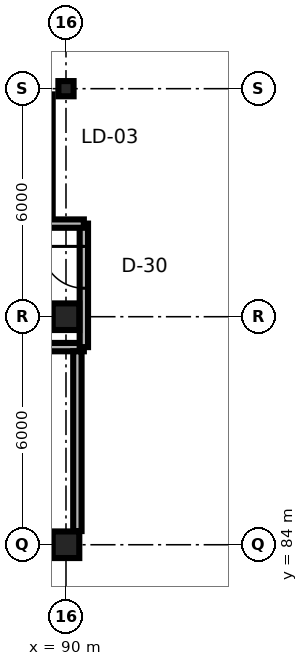
"""IFC4 building model, lengths in metres.
Left out: names, types, materials, properties, quantities, classifications, styles, units other than length and angle.
Written with IfcOpenShell. Run it as: python <this file> out.ifc"""

import sys

from ifc_helpers import new_model, si_unit, direction, frame, frame_2d, origin, origin_2d, place, context, subcontext, project, spatial, rectangle, i_section, extrude, element, fill, save


model = new_model("IFC4")
c1 = context("Model", 3, precision=1e-05, world=origin(), true_north=direction((0.0, 1.0)))
c2 = subcontext(c1, "Body", "Model", "MODEL_VIEW")
j1 = project(units=[si_unit("LENGTHUNIT", "METRE"), si_unit("PLANEANGLEUNIT", "RADIAN")], contexts=[c1])
p1 = place(None, origin())
s1 = spatial("IfcSite", under=j1, at=p1, CompositionType="ELEMENT")
p2 = place(p1, origin())
s2 = spatial("IfcBuilding", under=s1, at=p2, CompositionType="ELEMENT")
p3 = place(p2, frame((0.0, 0.0, 21.0)))
s3 = spatial("IfcBuildingStorey", under=s2, at=p3, CompositionType="ELEMENT", Elevation=21.0)
for number, where, z_axis, x_axis in (
    (1, (90.0, 84.0, 0.0), (0.0, 0.0, 1.0), (1.0, 0.0, 0.0)),
    (2, (90.0, 90.0, 0.0), (0.0, 0.0, 1.0), (1.0, 0.0, 0.0)),
):
    element("IfcColumn", number, at=place(p3, frame(where, z_axis=z_axis, x_axis=x_axis)), inside=s3, PredefinedType="COLUMN", context=c2, shape_type="SweptSolid", body=[
        extrude(rectangle(XDim=0.7, YDim=0.7, at=origin_2d()), origin(), (0.0, 0.0, 1.0), 3.9),
    ])
p4 = place(p3, frame((90.0, 96.0, 0.0), z_axis=(0.0, 0.0, 1.0), x_axis=(1.0, 0.0, 0.0)))
e3 = element("IfcColumn", 3, at=p4, inside=s3, PredefinedType="COLUMN", context=c2, shape_type="SweptSolid", body=[
    extrude(i_section(OverallWidth=0.4, OverallDepth=0.4, WebThickness=0.013, FlangeThickness=0.021, FilletRadius=0.022, at=origin_2d()), origin(), (0.0, 0.0, 1.0), 3.9),
])
p5 = place(p3, frame((89.5, 92.45, 0.0), z_axis=(0.0, 0.0, 1.0), x_axis=(0.0, 1.0, 0.0)))
e4 = element("IfcWall", 4, at=p5, inside=s3, PredefinedType="SHEAR", context=c2, shape_type="SweptSolid", body=[
    extrude(rectangle(XDim=3.4, YDim=0.3, at=frame_2d((1.7, 0.0))), origin(), (0.0, 0.0, 1.0), 3.74),
])
p6 = place(p3, frame((87.8, 84.0, 0.0), z_axis=(0.0, 0.0, 1.0), x_axis=(1.0, 0.0, 0.0)))
e5 = element("IfcWall", 5, at=p6, inside=s3, PredefinedType="PARTITIONING", context=c2, shape_type="SweptSolid", body=[
    extrude(rectangle(XDim=2.5, YDim=0.22, at=frame_2d((1.25, 0.0))), origin(), (0.0, 0.0, 1.0), 3.312),
])
p7 = place(p6, frame((0.75, 0.0, 0.0)))
e6 = element("IfcOpeningElement", 6, at=p7, cuts=e5, PredefinedType="OPENING", context=c2, shape_type="SweptSolid", body=[
    extrude(rectangle(XDim=1.0, YDim=2.15, at=frame_2d((0.5, 1.075))), frame((0.0, 0.125, 0.0), z_axis=(0.0, -1.0, 0.0), x_axis=(1.0, 0.0, 0.0)), (0.0, 0.0, 1.0), 0.25),
])
p8 = place(p3, frame((80.6, 89.2, 0.0), z_axis=(0.0, 0.0, 1.0), x_axis=(1.0, 0.0, 0.0)))
e7 = element("IfcWall", 7, at=p8, inside=s3, PredefinedType="PARTITIONING", context=c2, shape_type="SweptSolid", body=[
    extrude(rectangle(XDim=9.87, YDim=0.22, at=frame_2d((4.935, 0.0))), origin(), (0.0, 0.0, 1.0), 3.7),
])
p9 = place(p3, frame((90.47, 89.2, 0.0), z_axis=(0.0, 0.0, 1.0), x_axis=(0.0, 1.0, 0.0)))
e8 = element("IfcWall", 8, at=p9, inside=s3, PredefinedType="PARTITIONING", context=c2, shape_type="SweptSolid", body=[
    extrude(rectangle(XDim=3.25, YDim=0.22, at=frame_2d((1.625, 0.0))), origin(), (0.0, 0.0, 1.0), 3.7),
])
p10 = place(p9, frame((1.55, 0.0, 0.0)))
e9 = element("IfcOpeningElement", 9, at=p10, cuts=e8, PredefinedType="OPENING", context=c2, shape_type="SweptSolid", body=[
    extrude(rectangle(XDim=1.1, YDim=2.15, at=frame_2d((0.55, 1.075))), frame((0.0, 0.125, 0.0), z_axis=(0.0, -1.0, 0.0), x_axis=(1.0, 0.0, 0.0)), (0.0, 0.0, 1.0), 0.25),
])
p11 = place(p3, frame((90.3, 84.36, 0.0), z_axis=(0.0, 0.0, 1.0), x_axis=(0.0, 1.0, 0.0)))
e10 = element("IfcWall", 10, at=p11, inside=s3, PredefinedType="PARTITIONING", context=c2, shape_type="SweptSolid", body=[
    extrude(rectangle(XDim=4.73, YDim=0.22, at=frame_2d((2.365, 0.0))), origin(), (0.0, 0.0, 1.0), 3.7),
])
p12 = place(p3, frame((89.5, 92.45, 0.0), z_axis=(0.0, 0.0, 1.0), x_axis=(1.0, 0.0, 0.0)))
e11 = element("IfcWall", 11, at=p12, inside=s3, PredefinedType="PARTITIONING", context=c2, shape_type="SweptSolid", body=[
    extrude(rectangle(XDim=0.97, YDim=0.22, at=frame_2d((0.485, 0.0))), origin(), (0.0, 0.0, 1.0), 3.7),
])
p13 = place(p10, origin())
e12 = element("IfcDoor", 12, at=p13, inside=s3, OperationType="SINGLE_SWING_RIGHT", PredefinedType="DOOR", context=c2, shape_type="SweptSolid", body=[
    extrude(rectangle(XDim=1.1, YDim=2.15, at=frame_2d((0.55, 1.075))), frame((0.0, 0.025, 0.0), z_axis=(0.0, -1.0, 0.0), x_axis=(1.0, 0.0, 0.0)), (0.0, 0.0, 1.0), 0.05),
])
fill(e9, e12)
save(model, sys.argv[1])
